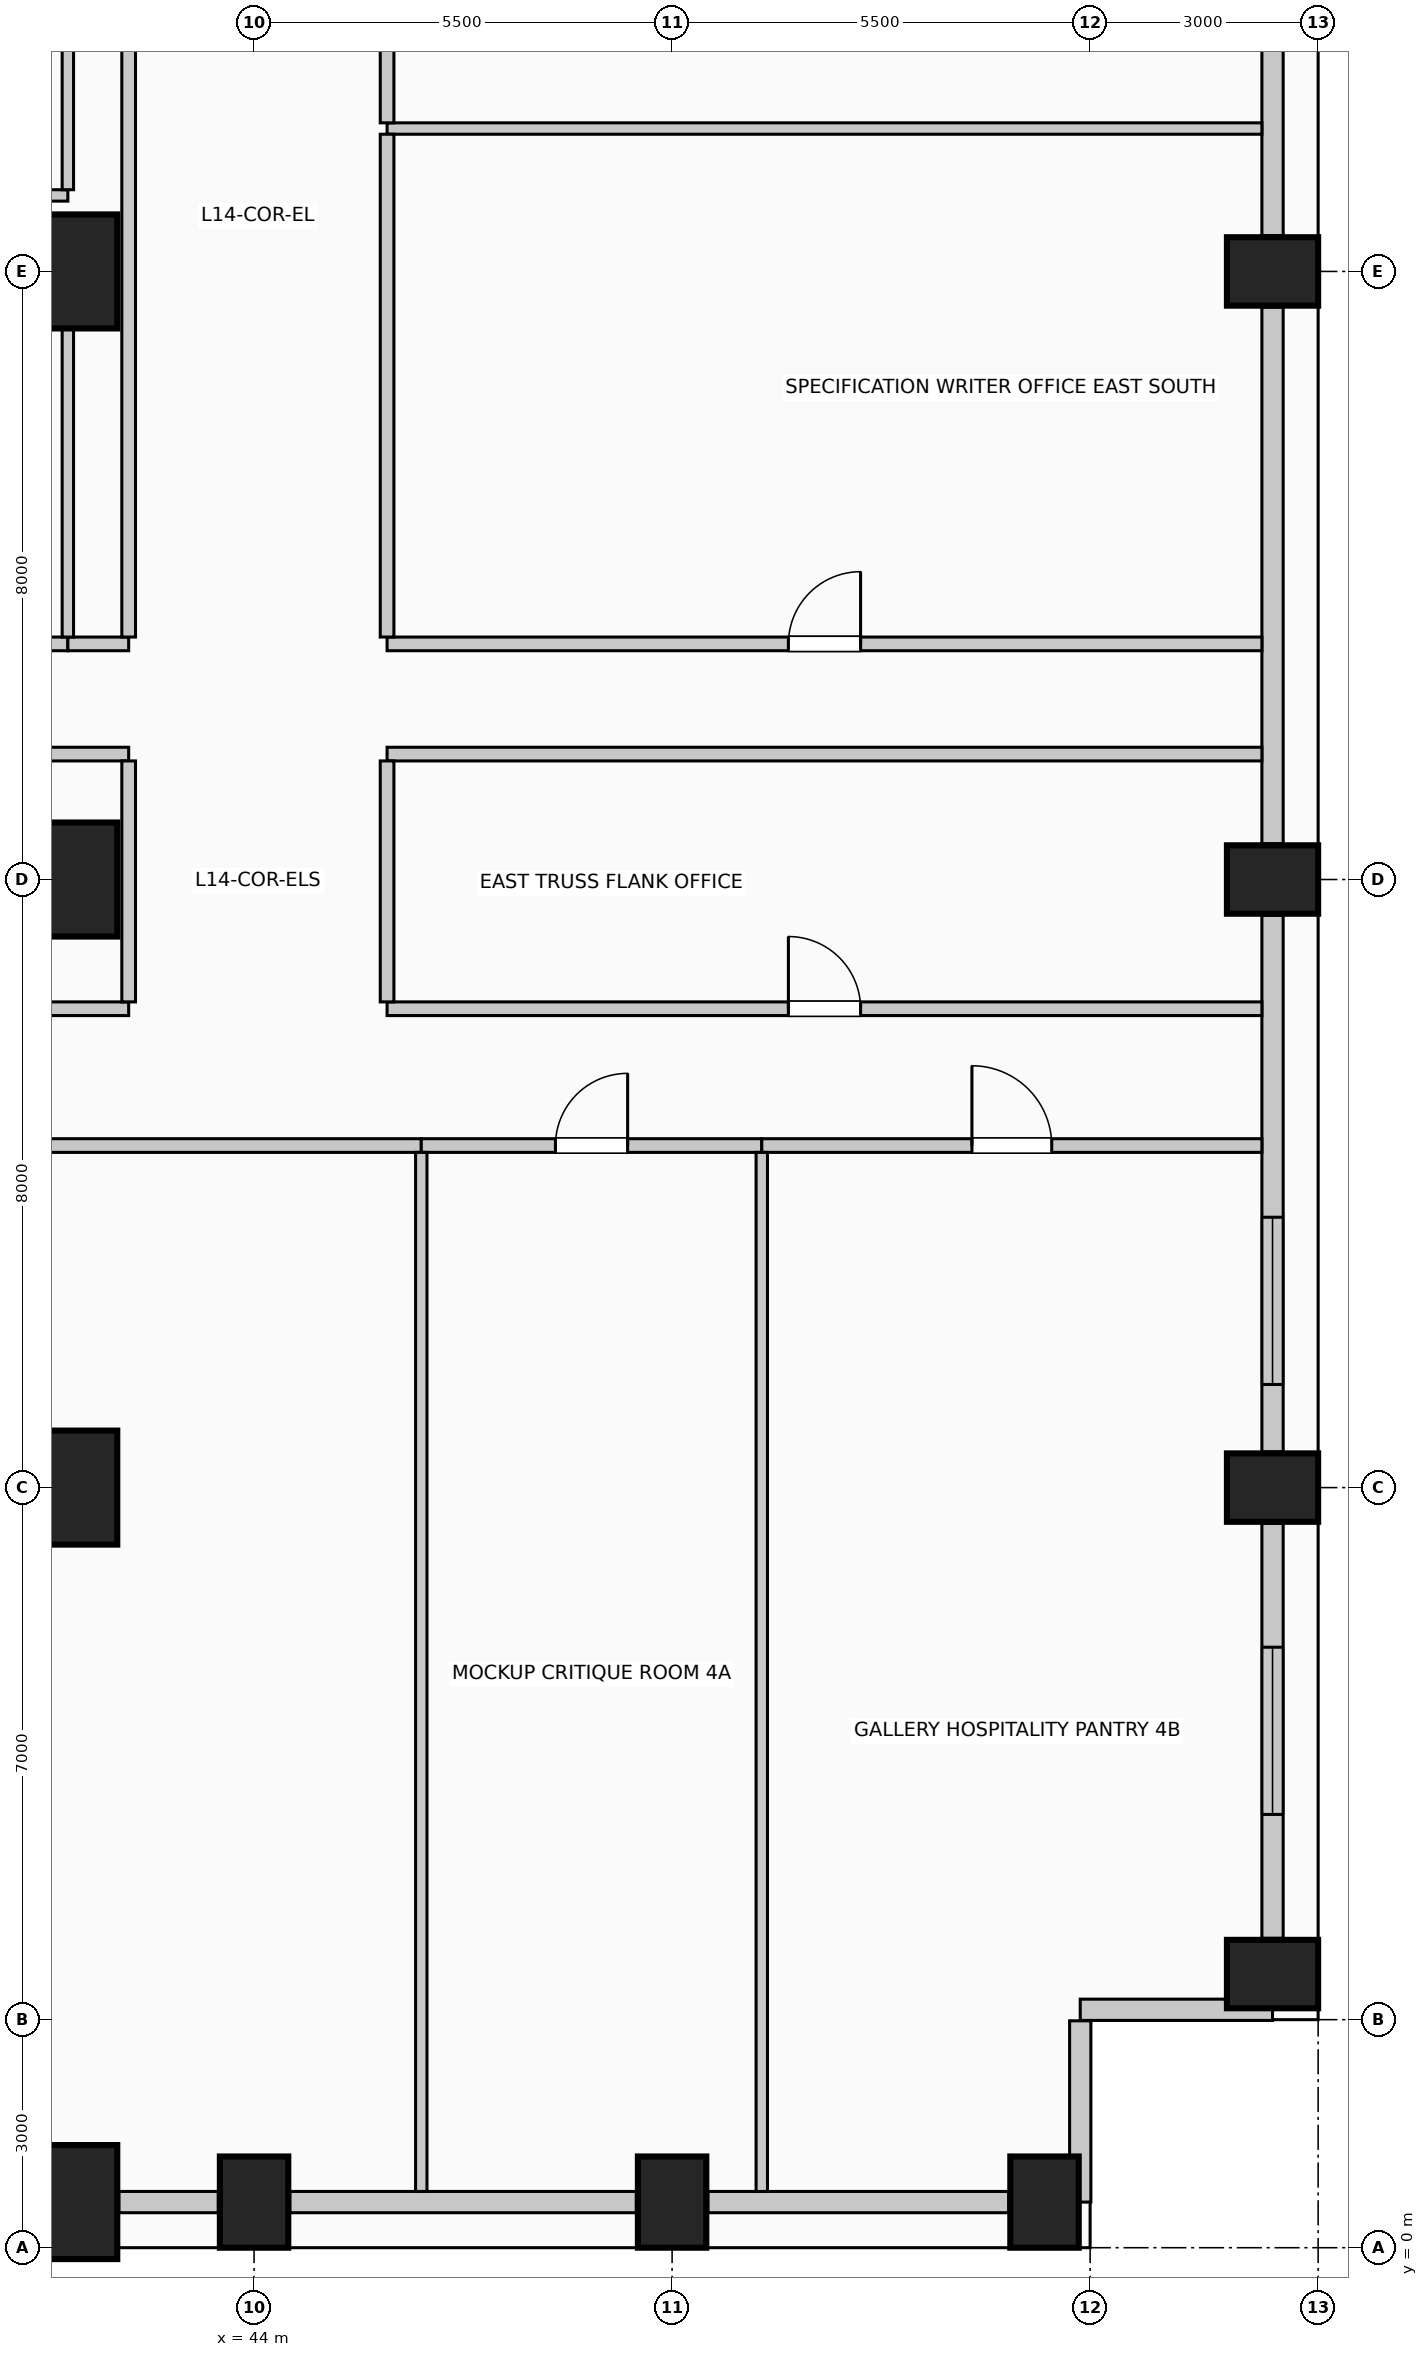
"""IFC4 building model, lengths in metres.
Left out: names, types, materials, properties, quantities, classifications, styles, units other than length and angle.
Written with IfcOpenShell. Run it as: python <this file> out.ifc"""

import sys

from ifc_helpers import new_model, si_unit, direction, frame, frame_2d, origin, origin_2d, place, context, subcontext, project, spatial, rectangle, extrude, element, fill, save


model = new_model("IFC4")
c1 = context("Model", 3, precision=1e-05, world=origin(), true_north=direction((0.0, 1.0)))
c2 = subcontext(c1, "Body", "Model", "MODEL_VIEW")
j1 = project(units=[si_unit("LENGTHUNIT", "METRE"), si_unit("PLANEANGLEUNIT", "RADIAN")], contexts=[c1])
p1 = place(None, origin())
s1 = spatial("IfcSite", under=j1, at=p1, CompositionType="ELEMENT")
p2 = place(p1, origin())
s2 = spatial("IfcBuilding", under=s1, at=p2, CompositionType="ELEMENT")
p3 = place(p2, frame((0.0, 0.0, 58.6)))
s3 = spatial("IfcBuildingStorey", under=s2, at=p3, CompositionType="ELEMENT", Elevation=58.6)
p4 = place(p3, frame((41.6, 0.6, 0.0), z_axis=(0.0, 0.0, 1.0), x_axis=(1.0, 0.0, 0.0)))
e1 = element("IfcColumn", 1, at=p4, inside=s3, PredefinedType="COLUMN", context=c2, shape_type="SweptSolid", body=[
    extrude(rectangle(XDim=1.2, YDim=1.5, at=origin_2d()), origin(), (0.0, 0.0, 1.0), 4.0),
])
for number, where, z_axis, x_axis in (
    (2, (44.0, 0.6, 0.0), (0.0, 0.0, 1.0), (1.0, 0.0, 0.0)),
    (3, (49.5, 0.6, 0.0), (0.0, 0.0, 1.0), (1.0, 0.0, 0.0)),
    (4, (54.4, 0.6, 0.0), (0.0, 0.0, 1.0), (1.0, 0.0, 0.0)),
    (5, (57.4, 3.6, 0.0), (0.0, 0.0, 1.0), (0.0, 1.0, 0.0)),
    (6, (57.4, 10.0, 0.0), (0.0, 0.0, 1.0), (0.0, 1.0, 0.0)),
    (7, (57.4, 18.0, 0.0), (0.0, 0.0, 1.0), (0.0, 1.0, 0.0)),
    (8, (57.4, 26.0, 0.0), (0.0, 0.0, 1.0), (0.0, 1.0, 0.0)),
):
    element("IfcColumn", number, at=place(p3, frame(where, z_axis=z_axis, x_axis=x_axis)), inside=s3, PredefinedType="COLUMN", context=c2, shape_type="SweptSolid", body=[
        extrude(rectangle(XDim=0.9, YDim=1.2, at=origin_2d()), origin(), (0.0, 0.0, 1.0), 4.0),
    ])
for number, where, z_axis, x_axis in (
    (9, (41.6, 10.0, 0.0), (0.0, 0.0, 1.0), (1.0, 0.0, 0.0)),
    (10, (41.6, 18.0, 0.0), (0.0, 0.0, 1.0), (1.0, 0.0, 0.0)),
    (11, (41.6, 26.0, 0.0), (0.0, 0.0, 1.0), (1.0, 0.0, 0.0)),
):
    element("IfcColumn", number, at=place(p3, frame(where, z_axis=z_axis, x_axis=x_axis)), inside=s3, PredefinedType="COLUMN", context=c2, shape_type="SweptSolid", body=[
        extrude(rectangle(XDim=1.2, YDim=1.5, at=origin_2d()), origin(), (0.0, 0.0, 1.0), 4.0),
    ])
p5 = place(p3, frame((43.53, 0.6, 0.0), z_axis=(0.0, 0.0, 1.0), x_axis=(-1.0, 0.0, 0.0)))
e12 = element("IfcWall", 12, at=p5, inside=s3, PredefinedType="SOLIDWALL", context=c2, shape_type="SweptSolid", body=[
    extrude(rectangle(XDim=1.31, YDim=0.28, at=frame_2d((0.655, 0.0))), origin(), (0.0, 0.0, 1.0), 2.85),
])
p6 = place(p3, frame((49.03, 0.6, 0.0), z_axis=(0.0, 0.0, 1.0), x_axis=(-1.0, 0.0, 0.0)))
e13 = element("IfcWall", 13, at=p6, inside=s3, PredefinedType="SOLIDWALL", context=c2, shape_type="SweptSolid", body=[
    extrude(rectangle(XDim=4.56, YDim=0.28, at=frame_2d((2.28, 0.0))), origin(), (0.0, 0.0, 1.0), 2.85),
])
p7 = place(p3, frame((53.93, 0.6, 0.0), z_axis=(0.0, 0.0, 1.0), x_axis=(-1.0, 0.0, 0.0)))
e14 = element("IfcWall", 14, at=p7, inside=s3, PredefinedType="SOLIDWALL", context=c2, shape_type="SweptSolid", body=[
    extrude(rectangle(XDim=3.96, YDim=0.28, at=frame_2d((1.98, 0.0))), origin(), (0.0, 0.0, 1.0), 2.85),
])
p8 = place(p3, frame((57.4, 9.53, 0.0), z_axis=(0.0, 0.0, 1.0), x_axis=(0.0, -1.0, 0.0)))
e15 = element("IfcWall", 15, at=p8, inside=s3, PredefinedType="SOLIDWALL", context=c2, shape_type="SweptSolid", body=[
    extrude(rectangle(XDim=5.46, YDim=0.28, at=frame_2d((2.73, 0.0))), origin(), (0.0, 0.0, 1.0), 2.85),
])
p9 = place(p8, frame((1.63, 0.0, 0.5)))
e16 = element("IfcOpeningElement", 16, at=p9, cuts=e15, PredefinedType="OPENING", context=c2, shape_type="SweptSolid", body=[
    extrude(rectangle(XDim=2.2, YDim=1.95, at=frame_2d((1.1, 0.975))), frame((0.0, 0.15, 0.0), z_axis=(0.0, -1.0, 0.0), x_axis=(1.0, 0.0, 0.0)), (0.0, 0.0, 1.0), 0.3),
])
p10 = place(p3, frame((57.4, 17.53, 0.0), z_axis=(0.0, 0.0, 1.0), x_axis=(0.0, -1.0, 0.0)))
e17 = element("IfcWall", 17, at=p10, inside=s3, PredefinedType="SOLIDWALL", context=c2, shape_type="SweptSolid", body=[
    extrude(rectangle(XDim=7.06, YDim=0.28, at=frame_2d((3.53, 0.0))), origin(), (0.0, 0.0, 1.0), 2.85),
])
p11 = place(p10, frame((3.973, 0.0, 0.5)))
e18 = element("IfcOpeningElement", 18, at=p11, cuts=e17, PredefinedType="OPENING", context=c2, shape_type="SweptSolid", body=[
    extrude(rectangle(XDim=2.2, YDim=1.95, at=frame_2d((1.1, 0.975))), frame((0.0, 0.15, 0.0), z_axis=(0.0, -1.0, 0.0), x_axis=(1.0, 0.0, 0.0)), (0.0, 0.0, 1.0), 0.3),
])
for number, where, z_axis, x_axis in (
    (19, (57.4, 25.53, 0.0), (0.0, 0.0, 1.0), (0.0, -1.0, 0.0)),
    (20, (57.4, 33.53, 0.0), (0.0, 0.0, 1.0), (0.0, -1.0, 0.0)),
):
    element("IfcWall", number, at=place(p3, frame(where, z_axis=z_axis, x_axis=x_axis)), inside=s3, PredefinedType="SOLIDWALL", context=c2, shape_type="SweptSolid", body=[
        extrude(rectangle(XDim=7.06, YDim=0.28, at=frame_2d((3.53, 0.0))), origin(), (0.0, 0.0, 1.0), 2.85),
    ])
p12 = place(p3, frame((57.4, 3.13, 0.0), z_axis=(0.0, 0.0, 1.0), x_axis=(-1.0, 0.0, 0.0)))
e21 = element("IfcWall", 21, at=p12, inside=s3, PredefinedType="SOLIDWALL", context=c2, shape_type="SweptSolid", body=[
    extrude(rectangle(XDim=2.53, YDim=0.28, at=frame_2d((1.265, 0.0))), origin(), (0.0, 0.0, 1.0), 3.7),
])
p13 = place(p3, frame((54.87, 2.985, 0.0), z_axis=(0.0, 0.0, 1.0), x_axis=(0.0, -1.0, 0.0)))
e22 = element("IfcWall", 22, at=p13, inside=s3, PredefinedType="SOLIDWALL", context=c2, shape_type="SweptSolid", body=[
    extrude(rectangle(XDim=2.385, YDim=0.28, at=frame_2d((1.192, 0.0))), origin(), (0.0, 0.0, 1.0), 3.7),
])
p14 = place(p3, frame((31.8, 14.5, 0.0), z_axis=(0.0, 0.0, 1.0), x_axis=(1.0, 0.0, 0.0)))
e23 = element("IfcWall", 23, at=p14, inside=s3, PredefinedType="PARTITIONING", context=c2, shape_type="SweptSolid", body=[
    extrude(rectangle(XDim=14.4, YDim=0.18, at=frame_2d((7.2, 0.0))), origin(), (0.0, 0.0, 1.0), 3.7),
])
p15 = place(p14, frame((6.675, 0.0, 0.0)))
e24 = element("IfcOpeningElement", 24, at=p15, cuts=e23, PredefinedType="OPENING", context=c2, shape_type="SweptSolid", body=[
    extrude(rectangle(XDim=1.05, YDim=2.15, at=frame_2d((0.525, 1.075))), frame((0.0, 0.1, 0.0), z_axis=(0.0, -1.0, 0.0), x_axis=(1.0, 0.0, 0.0)), (0.0, 0.0, 1.0), 0.2),
])
p16 = place(p3, frame((46.2, 14.5, 0.0), z_axis=(0.0, 0.0, 1.0), x_axis=(1.0, 0.0, 0.0)))
e25 = element("IfcWall", 25, at=p16, inside=s3, PredefinedType="PARTITIONING", context=c2, shape_type="SweptSolid", body=[
    extrude(rectangle(XDim=4.48, YDim=0.18, at=frame_2d((2.24, 0.0))), origin(), (0.0, 0.0, 1.0), 3.7),
])
p17 = place(p16, frame((1.765, 0.0, 0.0)))
e26 = element("IfcOpeningElement", 26, at=p17, cuts=e25, PredefinedType="OPENING", context=c2, shape_type="SweptSolid", body=[
    extrude(rectangle(XDim=0.95, YDim=2.15, at=frame_2d((0.475, 1.075))), frame((0.0, 0.1, 0.0), z_axis=(0.0, -1.0, 0.0), x_axis=(1.0, 0.0, 0.0)), (0.0, 0.0, 1.0), 0.2),
])
p18 = place(p3, frame((50.68, 14.5, 0.0), z_axis=(0.0, 0.0, 1.0), x_axis=(1.0, 0.0, 0.0)))
e27 = element("IfcWall", 27, at=p18, inside=s3, PredefinedType="PARTITIONING", context=c2, shape_type="SweptSolid", body=[
    extrude(rectangle(XDim=6.58, YDim=0.18, at=frame_2d((3.29, 0.0))), origin(), (0.0, 0.0, 1.0), 3.7),
])
p19 = place(p18, frame((2.765, 0.0, 0.0)))
e28 = element("IfcOpeningElement", 28, at=p19, cuts=e27, PredefinedType="OPENING", context=c2, shape_type="SweptSolid", body=[
    extrude(rectangle(XDim=1.05, YDim=2.15, at=frame_2d((0.525, 1.075))), frame((0.0, 0.1, 0.0), z_axis=(0.0, -1.0, 0.0), x_axis=(1.0, 0.0, 0.0)), (0.0, 0.0, 1.0), 0.2),
])
p20 = place(p3, frame((15.65, 16.3, 0.0), z_axis=(0.0, 0.0, 1.0), x_axis=(1.0, 0.0, 0.0)))
e29 = element("IfcWall", 29, at=p20, inside=s3, PredefinedType="PARTITIONING", context=c2, shape_type="SweptSolid", body=[
    extrude(rectangle(XDim=26.7, YDim=0.18, at=frame_2d((13.35, 0.0))), origin(), (0.0, 0.0, 1.0), 3.7),
])
p21 = place(p3, frame((45.75, 16.3, 0.0), z_axis=(0.0, 0.0, 1.0), x_axis=(1.0, 0.0, 0.0)))
e30 = element("IfcWall", 30, at=p21, inside=s3, PredefinedType="PARTITIONING", context=c2, shape_type="SweptSolid", body=[
    extrude(rectangle(XDim=11.51, YDim=0.18, at=frame_2d((5.755, 0.0))), origin(), (0.0, 0.0, 1.0), 3.7),
])
p22 = place(p21, frame((5.28, 0.0, 0.0)))
e31 = element("IfcOpeningElement", 31, at=p22, cuts=e30, PredefinedType="OPENING", context=c2, shape_type="SweptSolid", body=[
    extrude(rectangle(XDim=0.95, YDim=2.15, at=frame_2d((0.475, 1.075))), frame((0.0, 0.1, 0.0), z_axis=(0.0, -1.0, 0.0), x_axis=(1.0, 0.0, 0.0)), (0.0, 0.0, 1.0), 0.2),
])
p23 = place(p3, frame((15.65, 19.65, 0.0), z_axis=(0.0, 0.0, 1.0), x_axis=(1.0, 0.0, 0.0)))
e32 = element("IfcWall", 32, at=p23, inside=s3, PredefinedType="PARTITIONING", context=c2, shape_type="SweptSolid", body=[
    extrude(rectangle(XDim=26.7, YDim=0.18, at=frame_2d((13.35, 0.0))), origin(), (0.0, 0.0, 1.0), 3.7),
])
p24 = place(p3, frame((45.75, 19.65, 0.0), z_axis=(0.0, 0.0, 1.0), x_axis=(1.0, 0.0, 0.0)))
e33 = element("IfcWall", 33, at=p24, inside=s3, PredefinedType="PARTITIONING", context=c2, shape_type="SweptSolid", body=[
    extrude(rectangle(XDim=11.51, YDim=0.18, at=frame_2d((5.755, 0.0))), origin(), (0.0, 0.0, 1.0), 3.7),
])
p25 = place(p3, frame((27.5, 21.1, 0.0), z_axis=(0.0, 0.0, 1.0), x_axis=(1.0, 0.0, 0.0)))
e34 = element("IfcWall", 34, at=p25, inside=s3, PredefinedType="PARTITIONING", context=c2, shape_type="SweptSolid", body=[
    extrude(rectangle(XDim=14.05, YDim=0.18, at=frame_2d((7.025, 0.0))), origin(), (0.0, 0.0, 1.0), 3.7),
])
p26 = place(p25, frame((6.55, 0.0, 0.0)))
e35 = element("IfcOpeningElement", 35, at=p26, cuts=e34, PredefinedType="OPENING", context=c2, shape_type="SweptSolid", body=[
    extrude(rectangle(XDim=0.95, YDim=2.15, at=frame_2d((0.475, 1.075))), frame((0.0, 0.1, 0.0), z_axis=(0.0, -1.0, 0.0), x_axis=(1.0, 0.0, 0.0)), (0.0, 0.0, 1.0), 0.2),
])
p27 = place(p3, frame((41.55, 21.1, 0.0), z_axis=(0.0, 0.0, 1.0), x_axis=(1.0, 0.0, 0.0)))
e36 = element("IfcWall", 36, at=p27, inside=s3, PredefinedType="PARTITIONING", context=c2, shape_type="SweptSolid", body=[
    extrude(rectangle(XDim=0.8, YDim=0.18, at=frame_2d((0.4, 0.0))), origin(), (0.0, 0.0, 1.0), 3.7),
])
p28 = place(p3, frame((45.75, 21.1, 0.0), z_axis=(0.0, 0.0, 1.0), x_axis=(1.0, 0.0, 0.0)))
e37 = element("IfcWall", 37, at=p28, inside=s3, PredefinedType="PARTITIONING", context=c2, shape_type="SweptSolid", body=[
    extrude(rectangle(XDim=11.51, YDim=0.18, at=frame_2d((5.755, 0.0))), origin(), (0.0, 0.0, 1.0), 3.7),
])
p29 = place(p28, frame((5.28, 0.0, 0.0)))
e38 = element("IfcOpeningElement", 38, at=p29, cuts=e37, PredefinedType="OPENING", context=c2, shape_type="SweptSolid", body=[
    extrude(rectangle(XDim=0.95, YDim=2.15, at=frame_2d((0.475, 1.075))), frame((0.0, 0.1, 0.0), z_axis=(0.0, -1.0, 0.0), x_axis=(1.0, 0.0, 0.0)), (0.0, 0.0, 1.0), 0.2),
])
p30 = place(p3, frame((27.5, 27.0, 0.0), z_axis=(0.0, 0.0, 1.0), x_axis=(1.0, 0.0, 0.0)))
e39 = element("IfcWall", 39, at=p30, inside=s3, PredefinedType="PARTITIONING", context=c2, shape_type="SweptSolid", body=[
    extrude(rectangle(XDim=14.05, YDim=0.15, at=frame_2d((7.025, 0.0))), origin(), (0.0, 0.0, 1.0), 3.7),
])
p31 = place(p3, frame((45.75, 27.88, 0.0), z_axis=(0.0, 0.0, 1.0), x_axis=(1.0, 0.0, 0.0)))
e40 = element("IfcWall", 40, at=p31, inside=s3, PredefinedType="PARTITIONING", context=c2, shape_type="SweptSolid", body=[
    extrude(rectangle(XDim=11.51, YDim=0.15, at=frame_2d((5.755, 0.0))), origin(), (0.0, 0.0, 1.0), 3.7),
])
p32 = place(p3, frame((41.55, 21.19, 0.0), z_axis=(0.0, 0.0, 1.0), x_axis=(0.0, 1.0, 0.0)))
e41 = element("IfcWall", 41, at=p32, inside=s3, PredefinedType="PARTITIONING", context=c2, shape_type="SweptSolid", body=[
    extrude(rectangle(XDim=4.06, YDim=0.15, at=frame_2d((2.03, 0.0))), origin(), (0.0, 0.0, 1.0), 2.995),
])
p33 = place(p3, frame((41.55, 27.075, 0.0), z_axis=(0.0, 0.0, 1.0), x_axis=(0.0, 1.0, 0.0)))
e42 = element("IfcWall", 42, at=p33, inside=s3, PredefinedType="PARTITIONING", context=c2, shape_type="SweptSolid", body=[
    extrude(rectangle(XDim=5.2, YDim=0.15, at=frame_2d((2.6, 0.0))), origin(), (0.0, 0.0, 1.0), 2.995),
])
p34 = place(p3, frame((42.35, 16.39, 0.0), z_axis=(0.0, 0.0, 1.0), x_axis=(0.0, 1.0, 0.0)))
e43 = element("IfcWall", 43, at=p34, inside=s3, PredefinedType="PARTITIONING", context=c2, shape_type="SweptSolid", body=[
    extrude(rectangle(XDim=3.17, YDim=0.18, at=frame_2d((1.585, 0.0))), origin(), (0.0, 0.0, 1.0), 3.7),
])
p35 = place(p3, frame((42.35, 21.19, 0.0), z_axis=(0.0, 0.0, 1.0), x_axis=(0.0, 1.0, 0.0)))
e44 = element("IfcWall", 44, at=p35, inside=s3, PredefinedType="PARTITIONING", context=c2, shape_type="SweptSolid", body=[
    extrude(rectangle(XDim=11.085, YDim=0.18, at=frame_2d((5.542, 0.0))), origin(), (0.0, 0.0, 1.0), 3.7),
])
p36 = place(p3, frame((45.75, 16.39, 0.0), z_axis=(0.0, 0.0, 1.0), x_axis=(0.0, 1.0, 0.0)))
e45 = element("IfcWall", 45, at=p36, inside=s3, PredefinedType="PARTITIONING", context=c2, shape_type="SweptSolid", body=[
    extrude(rectangle(XDim=3.17, YDim=0.18, at=frame_2d((1.585, 0.0))), origin(), (0.0, 0.0, 1.0), 3.7),
])
p37 = place(p3, frame((45.75, 21.19, 0.0), z_axis=(0.0, 0.0, 1.0), x_axis=(0.0, 1.0, 0.0)))
e46 = element("IfcWall", 46, at=p37, inside=s3, PredefinedType="PARTITIONING", context=c2, shape_type="SweptSolid", body=[
    extrude(rectangle(XDim=6.615, YDim=0.18, at=frame_2d((3.308, 0.0))), origin(), (0.0, 0.0, 1.0), 3.7),
])
p38 = place(p3, frame((45.75, 27.955, 0.0), z_axis=(0.0, 0.0, 1.0), x_axis=(0.0, 1.0, 0.0)))
e47 = element("IfcWall", 47, at=p38, inside=s3, PredefinedType="PARTITIONING", context=c2, shape_type="SweptSolid", body=[
    extrude(rectangle(XDim=4.32, YDim=0.18, at=frame_2d((2.16, 0.0))), origin(), (0.0, 0.0, 1.0), 3.7),
])
for number, where, z_axis, x_axis in (
    (48, (46.2, 0.74, 0.0), (0.0, 0.0, 1.0), (0.0, 1.0, 0.0)),
    (49, (50.68, 0.74, 0.0), (0.0, 0.0, 1.0), (0.0, 1.0, 0.0)),
):
    element("IfcWall", number, at=place(p3, frame(where, z_axis=z_axis, x_axis=x_axis)), inside=s3, PredefinedType="PARTITIONING", context=c2, shape_type="SweptSolid", body=[
        extrude(rectangle(XDim=13.67, YDim=0.15, at=frame_2d((6.835, 0.0))), origin(), (0.0, 0.0, 1.0), 3.7),
    ])
p39 = place(p9, origin())
e50 = element("IfcWindow", 50, at=p39, inside=s3, PartitioningType="SINGLE_PANEL", PredefinedType="WINDOW", context=c2, shape_type="SweptSolid", body=[
    extrude(rectangle(XDim=2.2, YDim=1.95, at=frame_2d((1.1, 0.975))), frame((0.0, 0.03, 0.0), z_axis=(0.0, -1.0, 0.0), x_axis=(1.0, 0.0, 0.0)), (0.0, 0.0, 1.0), 0.06),
])
fill(e16, e50)
p40 = place(p11, origin())
e51 = element("IfcWindow", 51, at=p40, inside=s3, PartitioningType="SINGLE_PANEL", PredefinedType="WINDOW", context=c2, shape_type="SweptSolid", body=[
    extrude(rectangle(XDim=2.2, YDim=1.95, at=frame_2d((1.1, 0.975))), frame((0.0, 0.03, 0.0), z_axis=(0.0, -1.0, 0.0), x_axis=(1.0, 0.0, 0.0)), (0.0, 0.0, 1.0), 0.06),
])
fill(e18, e51)
p41 = place(p17, origin())
e52 = element("IfcDoor", 52, at=p41, inside=s3, OperationType="SINGLE_SWING_RIGHT", PredefinedType="DOOR", context=c2, shape_type="SweptSolid", body=[
    extrude(rectangle(XDim=0.95, YDim=2.15, at=frame_2d((0.475, 1.075))), frame((0.0, 0.025, 0.0), z_axis=(0.0, -1.0, 0.0), x_axis=(1.0, 0.0, 0.0)), (0.0, 0.0, 1.0), 0.05),
])
fill(e26, e52)
p42 = place(p19, origin())
e53 = element("IfcDoor", 53, at=p42, inside=s3, OperationType="SINGLE_SWING_LEFT", PredefinedType="DOOR", context=c2, shape_type="SweptSolid", body=[
    extrude(rectangle(XDim=1.05, YDim=2.15, at=frame_2d((0.525, 1.075))), frame((0.0, 0.025, 0.0), z_axis=(0.0, -1.0, 0.0), x_axis=(1.0, 0.0, 0.0)), (0.0, 0.0, 1.0), 0.05),
])
fill(e28, e53)
p43 = place(p22, origin())
e54 = element("IfcDoor", 54, at=p43, inside=s3, OperationType="SINGLE_SWING_LEFT", PredefinedType="DOOR", context=c2, shape_type="SweptSolid", body=[
    extrude(rectangle(XDim=0.95, YDim=2.15, at=frame_2d((0.475, 1.075))), frame((0.0, 0.025, 0.0), z_axis=(0.0, -1.0, 0.0), x_axis=(1.0, 0.0, 0.0)), (0.0, 0.0, 1.0), 0.05),
])
fill(e31, e54)
p44 = place(p29, origin())
e55 = element("IfcDoor", 55, at=p44, inside=s3, OperationType="SINGLE_SWING_RIGHT", PredefinedType="DOOR", context=c2, shape_type="SweptSolid", body=[
    extrude(rectangle(XDim=0.95, YDim=2.15, at=frame_2d((0.475, 1.075))), frame((0.0, 0.025, 0.0), z_axis=(0.0, -1.0, 0.0), x_axis=(1.0, 0.0, 0.0)), (0.0, 0.0, 1.0), 0.05),
])
fill(e38, e55)
save(model, sys.argv[1])
